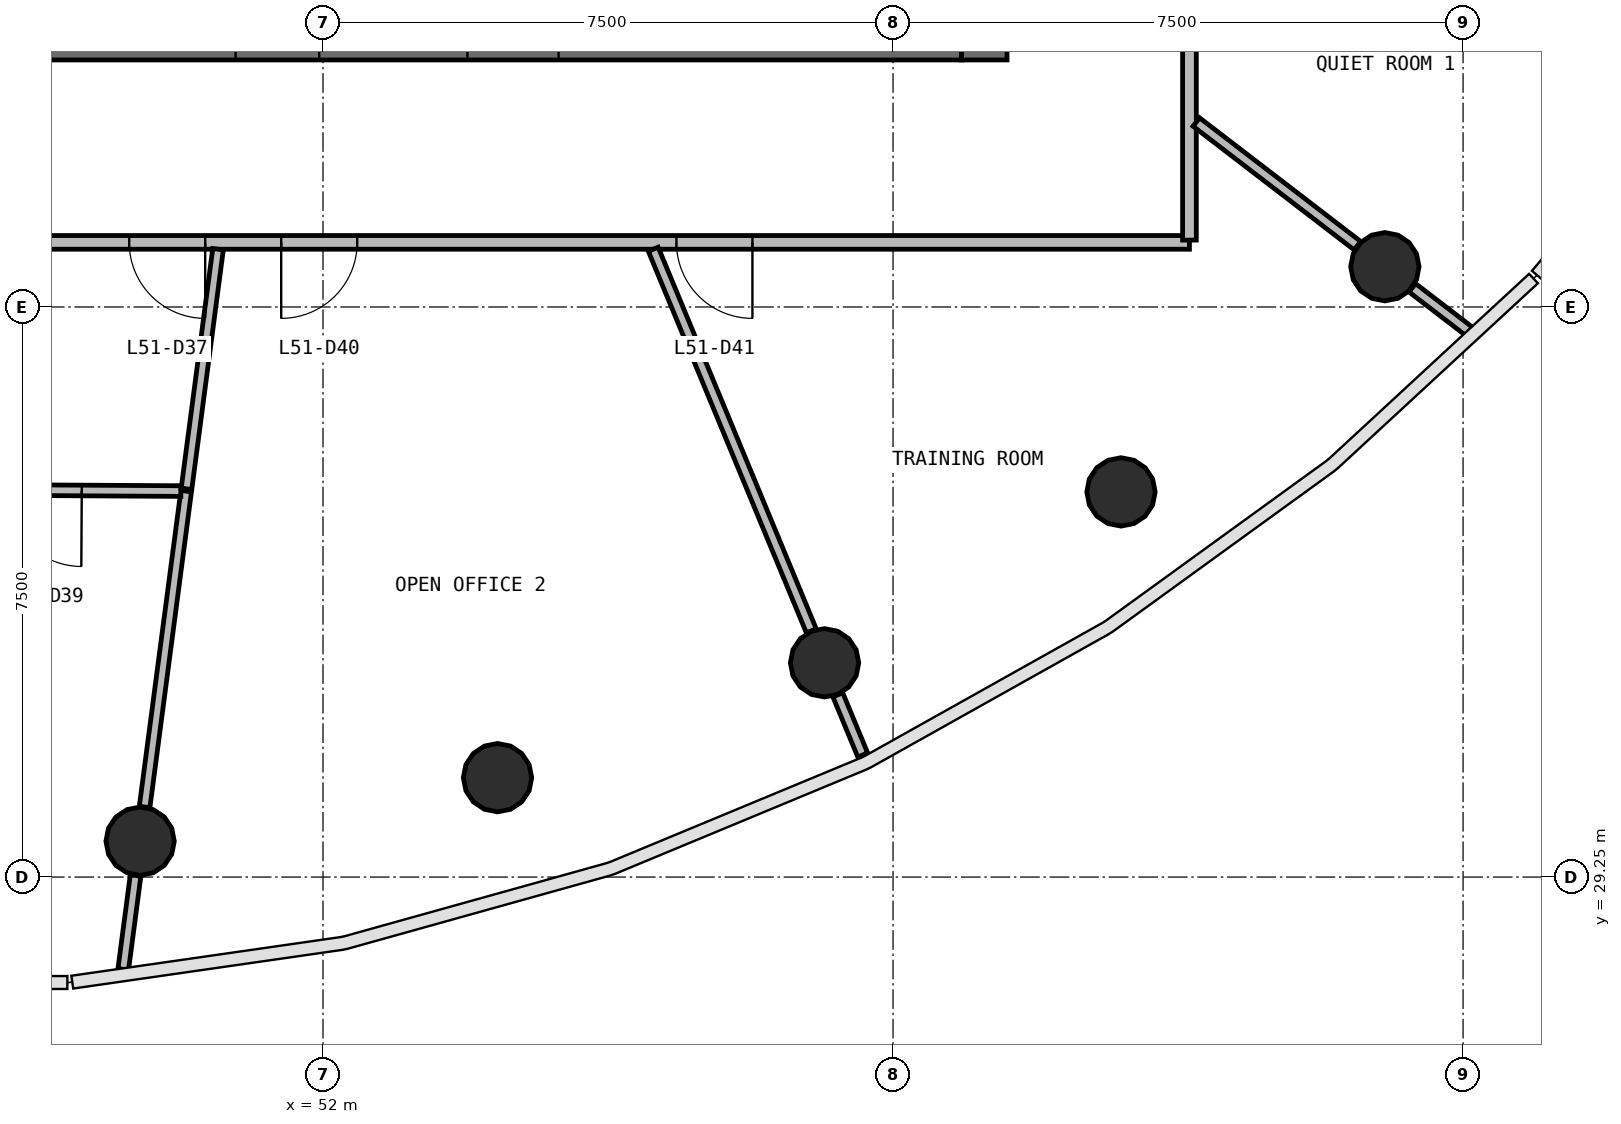
"""IFC4 building model, lengths in metres.
Left out: names, types, materials, properties, quantities, classifications, styles, units other than length and angle.
Written with IfcOpenShell. Run it as: python <this file> out.ifc"""

import sys

from ifc_helpers import new_model, si_unit, direction, frame, frame_2d, origin, origin_2d, place, context, subcontext, project, spatial, rectangle, circle, extrude, source, transform, mapped, element, fill, save


model = new_model("IFC4")
c1 = context("Model", 3, precision=1e-05, world=origin(), true_north=direction((0.0, 1.0)))
c2 = subcontext(c1, "Body", "Model", "MODEL_VIEW")
j1 = project(units=[si_unit("LENGTHUNIT", "METRE"), si_unit("PLANEANGLEUNIT", "RADIAN")], contexts=[c1])
p1 = place(None, origin())
s1 = spatial("IfcSite", under=j1, at=p1, CompositionType="ELEMENT")
p2 = place(p1, origin())
s2 = spatial("IfcBuilding", under=s1, at=p2, CompositionType="ELEMENT")
p3 = place(p2, frame((0.0, 0.0, 211.1)))
s3 = spatial("IfcBuildingStorey", under=s2, at=p3, CompositionType="ELEMENT", Elevation=211.1)
p4 = place(p3, frame((60.7, 40.0, 0.0), z_axis=(0.0, 0.0, 1.0), x_axis=(0.0, 1.0, 0.0)))
e1 = element("IfcWall", 1, at=p4, inside=s3, PredefinedType="SHEAR", context=c2, shape_type="SweptSolid", body=[
    extrude(rectangle(XDim=16.0, YDim=0.6, at=frame_2d((8.0, 0.0))), origin(), (0.0, 0.0, 1.0), 3.9),
])
p5 = place(p4, frame((7.1, 0.0, 0.0)))
e2 = element("IfcOpeningElement", 2, at=p5, cuts=e1, PredefinedType="OPENING", context=c2, shape_type="SweptSolid", body=[
    extrude(rectangle(XDim=1.8, YDim=2.1, at=frame_2d((0.9, 1.05))), frame((0.0, 0.31, 0.0), z_axis=(0.0, -1.0, 0.0), x_axis=(1.0, 0.0, 0.0)), (0.0, 0.0, 1.0), 0.62),
])
p6 = place(p3, frame((43.6, 40.3, 0.0), z_axis=(0.0, 0.0, 1.0), x_axis=(1.0, 0.0, 0.0)))
e3 = element("IfcWall", 3, at=p6, inside=s3, PredefinedType="SHEAR", context=c2, shape_type="SweptSolid", body=[
    extrude(rectangle(XDim=16.8, YDim=0.6, at=frame_2d((8.4, 0.0))), origin(), (0.0, 0.0, 1.0), 3.9),
])
p7 = place(p6, frame((10.3, 0.0, 0.0)))
e4 = element("IfcOpeningElement", 4, at=p7, cuts=e3, PredefinedType="OPENING", context=c2, shape_type="SweptSolid", body=[
    extrude(rectangle(XDim=1.2, YDim=2.1, at=frame_2d((0.6, 1.05))), frame((0.0, 0.31, 0.0), z_axis=(0.0, -1.0, 0.0), x_axis=(1.0, 0.0, 0.0)), (0.0, 0.0, 1.0), 0.62),
])
p8 = place(p6, frame((7.25, 0.0, 0.0)))
e5 = element("IfcOpeningElement", 5, at=p8, cuts=e3, PredefinedType="OPENING", context=c2, shape_type="SweptSolid", body=[
    extrude(rectangle(XDim=1.1, YDim=2.1, at=frame_2d((0.55, 1.05))), frame((0.0, 0.31, 0.0), z_axis=(0.0, -1.0, 0.0), x_axis=(1.0, 0.0, 0.0)), (0.0, 0.0, 1.0), 0.62),
])
p9 = place(p6, frame((0.7, 0.0, 0.0)))
e6 = element("IfcOpeningElement", 6, at=p9, cuts=e3, PredefinedType="OPENING", context=c2, shape_type="SweptSolid", body=[
    extrude(rectangle(XDim=0.8, YDim=2.1, at=frame_2d((0.4, 1.05))), frame((0.0, 0.31, 0.0), z_axis=(0.0, -1.0, 0.0), x_axis=(1.0, 0.0, 0.0)), (0.0, 0.0, 1.0), 0.62),
])
m1 = source(origin(), c2, "Body", "SweptSolid", [
    extrude(circle(Radius=0.45, at=origin_2d()), origin(), (0.0, 0.0, 1.0), 3.9),
])
for number, where, z_axis, x_axis in (
    (7, (49.594, 29.722, 0.0), (0.0, 0.0, 1.0), (1.0, 0.0, 0.0)),
    (8, (54.296, 30.558, 0.0), (0.0, 0.0, 1.0), (1.0, 0.0, 0.0)),
    (9, (58.599, 32.069, 0.0), (0.0, 0.0, 1.0), (1.0, 0.0, 0.0)),
    (10, (62.499, 34.317, 0.0), (0.0, 0.0, 1.0), (1.0, 0.0, 0.0)),
    (11, (65.971, 37.28, 0.0), (0.0, 0.0, 1.0), (1.0, 0.0, 0.0)),
):
    element("IfcColumn", number, at=place(p3, frame(where, z_axis=z_axis, x_axis=x_axis)), inside=s3, PredefinedType="COLUMN", context=c2, shape_type="MappedRepresentation", body=[
        mapped(m1, transform((0.0, 0.0, 0.0), scale=1.0)),
    ])
p10 = place(p3, frame((63.4, 37.6, 0.0), z_axis=(0.0, 0.0, 1.0), x_axis=(-1.0, 0.0, 0.0)))
e12 = element("IfcWall", 12, at=p10, inside=s3, PredefinedType="PARTITIONING", context=c2, shape_type="SweptSolid", body=[
    extrude(rectangle(XDim=22.8, YDim=0.18, at=frame_2d((11.4, 0.0))), origin(), (0.0, 0.0, 1.0), 2.88),
])
p11 = place(p10, frame((12.95, 0.0, 0.0)))
e13 = element("IfcOpeningElement", 13, at=p11, cuts=e12, PredefinedType="OPENING", context=c2, shape_type="SweptSolid", body=[
    extrude(rectangle(XDim=1.0, YDim=2.1, at=frame_2d((0.5, 1.05))), frame((0.0, 0.1, 0.0), z_axis=(0.0, -1.0, 0.0), x_axis=(1.0, 0.0, 0.0)), (0.0, 0.0, 1.0), 0.2),
])
p12 = place(p10, frame((10.95, 0.0, 0.0)))
e14 = element("IfcOpeningElement", 14, at=p12, cuts=e12, PredefinedType="OPENING", context=c2, shape_type="SweptSolid", body=[
    extrude(rectangle(XDim=1.0, YDim=2.1, at=frame_2d((0.5, 1.05))), frame((0.0, 0.1, 0.0), z_axis=(0.0, -1.0, 0.0), x_axis=(1.0, 0.0, 0.0)), (0.0, 0.0, 1.0), 0.2),
])
p13 = place(p10, frame((5.75, 0.0, 0.0)))
e15 = element("IfcOpeningElement", 15, at=p13, cuts=e12, PredefinedType="OPENING", context=c2, shape_type="SweptSolid", body=[
    extrude(rectangle(XDim=1.0, YDim=2.1, at=frame_2d((0.5, 1.05))), frame((0.0, 0.1, 0.0), z_axis=(0.0, -1.0, 0.0), x_axis=(1.0, 0.0, 0.0)), (0.0, 0.0, 1.0), 0.2),
])
p14 = place(p3, frame((63.4, 58.37, 0.0), z_axis=(0.0, 0.0, 1.0), x_axis=(0.0, -1.0, 0.0)))
e16 = element("IfcWall", 16, at=p14, inside=s3, PredefinedType="PARTITIONING", context=c2, shape_type="SweptSolid", body=[
    extrude(rectangle(XDim=20.74, YDim=0.18, at=frame_2d((10.37, 0.0))), origin(), (0.0, 0.0, 1.0), 2.88),
])
p15 = place(p14, frame((9.99, 0.0, 0.0)))
e17 = element("IfcOpeningElement", 17, at=p15, cuts=e16, PredefinedType="OPENING", context=c2, shape_type="SweptSolid", body=[
    extrude(rectangle(XDim=0.9, YDim=2.1, at=frame_2d((0.45, 1.05))), frame((0.0, 0.1, 0.0), z_axis=(0.0, -1.0, 0.0), x_axis=(1.0, 0.0, 0.0)), (0.0, 0.0, 1.0), 0.2),
])
p16 = place(p14, frame((7.79, 0.0, 0.0)))
e18 = element("IfcOpeningElement", 18, at=p16, cuts=e16, PredefinedType="OPENING", context=c2, shape_type="SweptSolid", body=[
    extrude(rectangle(XDim=0.9, YDim=2.1, at=frame_2d((0.45, 1.05))), frame((0.0, 0.1, 0.0), z_axis=(0.0, -1.0, 0.0), x_axis=(1.0, 0.0, 0.0)), (0.0, 0.0, 1.0), 0.2),
])
p17 = place(p14, frame((4.29, 0.0, 0.0)))
e19 = element("IfcOpeningElement", 19, at=p17, cuts=e16, PredefinedType="OPENING", context=c2, shape_type="SweptSolid", body=[
    extrude(rectangle(XDim=1.0, YDim=2.1, at=frame_2d((0.5, 1.05))), frame((0.0, 0.1, 0.0), z_axis=(0.0, -1.0, 0.0), x_axis=(1.0, 0.0, 0.0)), (0.0, 0.0, 1.0), 0.2),
])
p18 = place(p14, frame((15.49, 0.0, 0.0)))
e20 = element("IfcOpeningElement", 20, at=p18, cuts=e16, PredefinedType="OPENING", context=c2, shape_type="SweptSolid", body=[
    extrude(rectangle(XDim=1.0, YDim=2.1, at=frame_2d((0.5, 1.05))), frame((0.0, 0.1, 0.0), z_axis=(0.0, -1.0, 0.0), x_axis=(1.0, 0.0, 0.0)), (0.0, 0.0, 1.0), 0.2),
])
p19 = place(p14, frame((12.09, 0.0, 0.0)))
e21 = element("IfcOpeningElement", 21, at=p19, cuts=e16, PredefinedType="OPENING", context=c2, shape_type="SweptSolid", body=[
    extrude(rectangle(XDim=1.0, YDim=2.1, at=frame_2d((0.5, 1.05))), frame((0.0, 0.1, 0.0), z_axis=(0.0, -1.0, 0.0), x_axis=(1.0, 0.0, 0.0)), (0.0, 0.0, 1.0), 0.2),
])
p20 = place(p3, frame((56.345, 37.51, 0.0), z_axis=(0.0, 0.0, 1.0), x_axis=(0.382655972885, -0.923890906122, 0.0)))
e22 = element("IfcWall", 22, at=p20, inside=s3, PredefinedType="PARTITIONING", context=c2, shape_type="SweptSolid", body=[
    extrude(rectangle(XDim=5.435, YDim=0.14, at=frame_2d((2.717, 0.0))), origin(), (0.0, 0.0, 1.0), 2.88),
])
p21 = place(p3, frame((50.2, 34.328, 0.0), z_axis=(0.0, 0.0, 1.0), x_axis=(-0.130534370564, -0.99144378464, 0.0)))
e23 = element("IfcWall", 23, at=p21, inside=s3, PredefinedType="PARTITIONING", context=c2, shape_type="SweptSolid", body=[
    extrude(rectangle(XDim=4.191, YDim=0.14, at=frame_2d((2.096, 0.0))), origin(), (0.0, 0.0, 1.0), 2.88),
])
p22 = place(p3, frame((50.129, 34.328, 0.0), z_axis=(0.0, 0.0, 1.0), x_axis=(-0.999983244193, 0.005788897407, 0.0)))
e24 = element("IfcWall", 24, at=p22, inside=s3, PredefinedType="PARTITIONING", context=c2, shape_type="SweptSolid", body=[
    extrude(rectangle(XDim=3.753, YDim=0.14, at=frame_2d((1.877, 0.0))), origin(), (0.0, 0.0, 1.0), 2.88),
])
p23 = place(p22, frame((1.303, 0.0, 0.0)))
e25 = element("IfcOpeningElement", 25, at=p23, cuts=e24, PredefinedType="OPENING", context=c2, shape_type="SweptSolid", body=[
    extrude(rectangle(XDim=1.0, YDim=2.1, at=frame_2d((0.5, 1.05))), frame((0.0, 0.08, 0.0), z_axis=(0.0, -1.0, 0.0), x_axis=(1.0, 0.0, 0.0)), (0.0, 0.0, 1.0), 0.16),
])
p24 = place(p3, frame((50.619, 37.51, 0.0), z_axis=(0.0, 0.0, 1.0), x_axis=(-0.130524026108, -0.991445146546, 0.0)))
e26 = element("IfcWall", 26, at=p24, inside=s3, PredefinedType="PARTITIONING", context=c2, shape_type="SweptSolid", body=[
    extrude(rectangle(XDim=3.18, YDim=0.14, at=frame_2d((1.59, 0.0))), origin(), (0.0, 0.0, 1.0), 2.88),
])
p25 = place(p3, frame((63.49, 39.183, 0.0), z_axis=(0.0, 0.0, 1.0), x_axis=(0.793363703091, -0.608747923707, 0.0)))
e27 = element("IfcWall", 27, at=p25, inside=s3, PredefinedType="PARTITIONING", context=c2, shape_type="SweptSolid", body=[
    extrude(rectangle(XDim=2.673, YDim=0.14, at=frame_2d((1.336, 0.0))), origin(), (0.0, 0.0, 1.0), 2.88),
])
p26 = place(p3, frame((49.534, 29.271, 0.0), z_axis=(0.0, 0.0, 1.0), x_axis=(-0.130520415919, -0.991445621821, 0.0)))
e28 = element("IfcWall", 28, at=p26, inside=s3, PredefinedType="PARTITIONING", context=c2, shape_type="SweptSolid", body=[
    extrude(rectangle(XDim=1.246, YDim=0.14, at=frame_2d((0.623, 0.0))), origin(), (0.0, 0.0, 1.0), 2.88),
])
p27 = place(p3, frame((66.332, 37.003, 0.0), z_axis=(0.0, 0.0, 1.0), x_axis=(0.793344167197, -0.608773383431, 0.0)))
e29 = element("IfcWall", 29, at=p27, inside=s3, PredefinedType="PARTITIONING", context=c2, shape_type="SweptSolid", body=[
    extrude(rectangle(XDim=0.944, YDim=0.14, at=frame_2d((0.472, 0.0))), origin(), (0.0, 0.0, 1.0), 2.88),
])
p28 = place(p3, frame((58.773, 31.648, 0.0), z_axis=(0.0, 0.0, 1.0), x_axis=(0.382754217383, -0.92385020922, 0.0)))
e30 = element("IfcWall", 30, at=p28, inside=s3, PredefinedType="PARTITIONING", context=c2, shape_type="SweptSolid", body=[
    extrude(rectangle(XDim=0.857, YDim=0.14, at=frame_2d((0.429, 0.0))), origin(), (0.0, 0.0, 1.0), 2.88),
])
m2 = source(origin(), c2, "Body", "SweptSolid", [
    extrude(rectangle(XDim=1.0, YDim=2.1, at=frame_2d((0.5, 1.05))), frame((0.0, 0.025, 0.0), z_axis=(0.0, -1.0, 0.0), x_axis=(1.0, 0.0, 0.0)), (0.0, 0.0, 1.0), 0.05),
])
p29 = place(p11, origin())
e31 = element("IfcDoor", 31, at=p29, inside=s3, OperationType="SINGLE_SWING_LEFT", PredefinedType="DOOR", context=c2, shape_type="MappedRepresentation", body=[
    mapped(m2, transform((0.0, 0.0, 0.0), scale=1.0)),
])
fill(e13, e31)
p30 = place(p23, origin())
e32 = element("IfcDoor", 32, at=p30, inside=s3, OperationType="SINGLE_SWING_LEFT", PredefinedType="DOOR", context=c2, shape_type="MappedRepresentation", body=[
    mapped(m2, transform((0.0, 0.0, 0.0), scale=1.0)),
])
fill(e25, e32)
p31 = place(p12, origin())
e33 = element("IfcDoor", 33, at=p31, inside=s3, OperationType="SINGLE_SWING_RIGHT", PredefinedType="DOOR", context=c2, shape_type="MappedRepresentation", body=[
    mapped(m2, transform((0.0, 0.0, 0.0), scale=1.0)),
])
fill(e14, e33)
p32 = place(p13, origin())
e34 = element("IfcDoor", 34, at=p32, inside=s3, OperationType="SINGLE_SWING_LEFT", PredefinedType="DOOR", context=c2, shape_type="MappedRepresentation", body=[
    mapped(m2, transform((0.0, 0.0, 0.0), scale=1.0)),
])
fill(e15, e34)
save(model, sys.argv[1])
